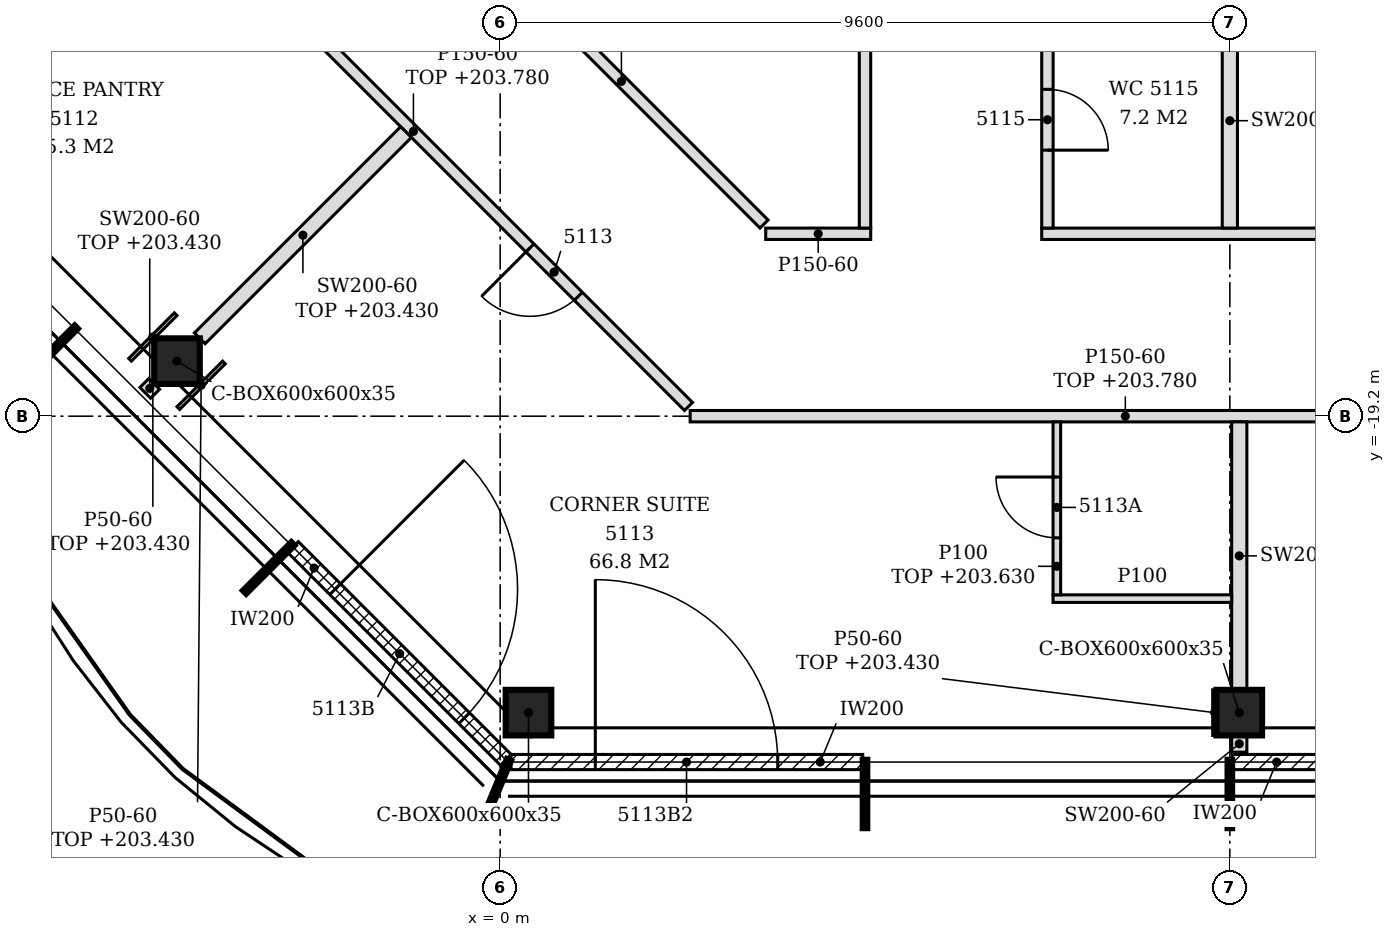
"""IFC4 building model, lengths in metres.
Left out: names, types, materials, properties, quantities, classifications, styles, units other than length and angle.
Written with IfcOpenShell. Run it as: python <this file> out.ifc"""

import sys

from ifc_helpers import new_model, si_unit, direction, frame, frame_2d, origin, origin_2d, place, context, subcontext, project, spatial, polyline, rectangle, hollow_rectangle, outline, extrude, clip, halfspace, element, fill, save


model = new_model("IFC4")
c1 = context("Model", 3, precision=1e-05, world=origin(), true_north=direction((0.0, 1.0)))
c2 = subcontext(c1, "Body", "Model", "MODEL_VIEW")
j1 = project(units=[si_unit("LENGTHUNIT", "METRE"), si_unit("PLANEANGLEUNIT", "RADIAN")], contexts=[c1])
p1 = place(None, origin())
s1 = spatial("IfcSite", under=j1, at=p1, CompositionType="ELEMENT")
p2 = place(p1, origin())
s2 = spatial("IfcBuilding", under=s1, at=p2, CompositionType="ELEMENT")
p3 = place(p2, frame((0.0, 0.0, 201.0)))
s3 = spatial("IfcBuildingStorey", under=s2, at=p3, CompositionType="ELEMENT", Elevation=201.0)
for number, where, z_axis, x_axis in (
    (1, (0.373, -23.1, -0.15), (0.0, 0.0, 1.0), (1.0, 0.0, 0.0)),
    (2, (9.724, -23.1, -0.15), (0.0, 0.0, 1.0), (1.0, 0.0, 0.0)),
    (3, (-4.251, -18.476, -0.15), (0.0, 0.0, 1.0), (1.0, 0.0, 0.0)),
):
    element("IfcColumn", number, at=place(p3, frame(where, z_axis=z_axis, x_axis=x_axis)), inside=s3, PredefinedType="COLUMN", context=c2, shape_type="Clipping", body=[
        clip(clip(extrude(hollow_rectangle(XDim=0.6, YDim=0.6, WallThickness=0.035, at=origin_2d()), origin(), (0.0, 0.0, 1.0), 3.5), halfspace(frame((0.0, 0.0, 0.011), z_axis=(0.0, 0.0, 1.0), x_axis=(1.0, 0.0, 0.0)), True)), halfspace(frame((0.0, 0.0, 3.095), z_axis=(0.0, 0.0, 1.0), x_axis=(1.0, 0.0, 0.0)), False)),
    ])
p4 = place(p3, frame((0.144, -23.75, 0.0), z_axis=(0.0, 0.0, 1.0), x_axis=(1.0, 0.0, 0.0)))
e4 = element("IfcWall", 4, at=p4, inside=s3, PredefinedType="NOTDEFINED", context=c2, shape_type="SweptSolid", body=[
    extrude(rectangle(XDim=4.626, YDim=0.2, at=frame_2d((2.313, 0.0))), origin(), (0.0, 0.0, 1.0), 3.35),
])
p5 = place(p4, frame((1.108, 0.0, 0.0)))
e5 = element("IfcOpeningElement", 5, at=p5, cuts=e4, PredefinedType="OPENING", context=c2, shape_type="SweptSolid", body=[
    extrude(rectangle(XDim=2.4, YDim=2.4, at=frame_2d((1.2, 1.2))), frame((0.0, 0.11, 0.0), z_axis=(0.0, -1.0, 0.0), x_axis=(1.0, 0.0, 0.0)), (0.0, 0.0, 1.0), 0.22),
])
p6 = place(p3, frame((9.63, -23.75, 0.0), z_axis=(0.0, 0.0, 1.0), x_axis=(1.0, 0.0, 0.0)))
e6 = element("IfcWall", 6, at=p6, inside=s3, PredefinedType="NOTDEFINED", context=c2, shape_type="SweptSolid", body=[
    extrude(rectangle(XDim=4.74, YDim=0.2, at=frame_2d((2.37, 0.0))), origin(), (0.0, 0.0, 1.0), 3.35),
])
p7 = place(p6, frame((1.17, 0.0, 0.0)))
e7 = element("IfcOpeningElement", 7, at=p7, cuts=e6, PredefinedType="OPENING", context=c2, shape_type="SweptSolid", body=[
    extrude(rectangle(XDim=2.4, YDim=2.4, at=frame_2d((1.2, 1.2))), frame((0.0, 0.11, 0.0), z_axis=(0.0, -1.0, 0.0), x_axis=(1.0, 0.0, 0.0)), (0.0, 0.0, 1.0), 0.22),
])
p8 = place(p3, frame((-2.726, -20.92, 0.0), z_axis=(0.0, 0.0, 1.0), x_axis=(0.707075965734, -0.707137595296, 0.0)))
e8 = element("IfcWall", 8, at=p8, inside=s3, PredefinedType="NOTDEFINED", context=c2, shape_type="SweptSolid", body=[
    extrude(rectangle(XDim=3.961, YDim=0.2, at=frame_2d((1.981, 0.0))), origin(), (0.0, 0.0, 1.0), 3.35),
])
p9 = place(p8, frame((0.786, 0.0, 0.0)))
e9 = element("IfcOpeningElement", 9, at=p9, cuts=e8, PredefinedType="OPENING", context=c2, shape_type="SweptSolid", body=[
    extrude(rectangle(XDim=2.4, YDim=2.4, at=frame_2d((1.2, 1.2))), frame((0.0, 0.11, 0.0), z_axis=(0.0, -1.0, 0.0), x_axis=(1.0, 0.0, 0.0)), (0.0, 0.0, 1.0), 0.22),
])
p10 = place(p3, frame((9.724, -23.62, 0.0), z_axis=(0.0, 0.0, 1.0), x_axis=(0.0, 1.0, 0.0)))
e10 = element("IfcWall", 10, at=p10, inside=s3, PredefinedType="PARTITIONING", context=c2, shape_type="SweptSolid", body=[
    extrude(outline(polyline([(0.0, 0.0), (0.22, 0.0), (0.22, 2.43), (0.07, 2.43), (0.068, 3.35), (0.0, 3.35), (0.0, 0.0)])), frame((0.0, 0.1, 0.0), z_axis=(0.0, -1.0, 0.0), x_axis=(1.0, 0.0, 0.0)), (0.0, 0.0, 1.0), 0.2),
])
p11 = place(p3, frame((9.724, -22.8, 0.0), z_axis=(0.0, 0.0, 1.0), x_axis=(0.0, 1.0, 0.0)))
e11 = element("IfcWall", 11, at=p11, inside=s3, PredefinedType="PARTITIONING", context=c2, shape_type="SweptSolid", body=[
    extrude(outline(polyline([(0.0, 0.0), (3.525, 0.0), (3.525, 2.78), (3.495, 2.78), (3.493, 3.35), (0.15, 3.35), (0.148, 2.43), (0.0, 2.43), (0.0, 0.0)])), frame((0.0, 0.1, 0.0), z_axis=(0.0, -1.0, 0.0), x_axis=(1.0, 0.0, 0.0)), (0.0, 0.0, 1.0), 0.2),
])
p12 = place(p3, frame((7.274, -21.6, 0.0), z_axis=(0.0, 0.0, 1.0), x_axis=(1.0, 0.0, 0.0)))
e12 = element("IfcWall", 12, at=p12, inside=s3, PredefinedType="PARTITIONING", context=c2, shape_type="SweptSolid", body=[
    extrude(outline(polyline([(0.0, 0.0), (2.35, 0.0), (2.35, 3.35), (0.076, 3.35), (0.074, 2.63), (0.0, 2.63), (0.0, 0.0)])), frame((0.0, 0.05, 0.0), z_axis=(0.0, -1.0, 0.0), x_axis=(1.0, 0.0, 0.0)), (0.0, 0.0, 1.0), 0.1),
])
p13 = place(p3, frame((7.324, -21.55, 0.0), z_axis=(0.0, 0.0, 1.0), x_axis=(0.0, 1.0, 0.0)))
e13 = element("IfcWall", 13, at=p13, inside=s3, PredefinedType="PARTITIONING", context=c2, shape_type="SweptSolid", body=[
    extrude(rectangle(XDim=2.275, YDim=0.1, at=frame_2d((1.138, 0.0))), origin(), (0.0, 0.0, 1.0), 2.63),
])
p14 = place(p13, frame((0.75, 0.0, 0.0)))
e14 = element("IfcOpeningElement", 14, at=p14, cuts=e13, PredefinedType="OPENING", context=c2, shape_type="SweptSolid", body=[
    extrude(rectangle(XDim=0.8, YDim=2.1, at=frame_2d((0.4, 1.05))), frame((0.0, 0.06, 0.0), z_axis=(0.0, -1.0, 0.0), x_axis=(1.0, 0.0, 0.0)), (0.0, 0.0, 1.0), 0.12),
])
p15 = place(p3, frame((2.5, -19.2, 0.0), z_axis=(0.0, 0.0, 1.0), x_axis=(1.0, 0.0, 0.0)))
e15 = element("IfcWall", 15, at=p15, inside=s3, PredefinedType="PARTITIONING", context=c2, shape_type="SweptSolid", body=[
    extrude(outline(polyline([(0.0, 0.0), (24.418, 0.0), (24.418, 2.78), (16.851, 2.78), (16.849, 2.322), (16.549, 2.322), (16.547, 2.78), (4.85, 2.78), (4.848, 2.63), (4.55, 2.63), (4.548, 2.78), (0.0, 2.78), (0.0, 0.0)])), frame((0.0, 0.075, 0.0), z_axis=(0.0, -1.0, 0.0), x_axis=(1.0, 0.0, 0.0)), (0.0, 0.0, 1.0), 0.15),
])
p16 = place(p15, frame((11.45, 0.0, 0.0)))
e16 = element("IfcOpeningElement", 16, at=p16, cuts=e15, PredefinedType="OPENING", context=c2, shape_type="SweptSolid", body=[
    extrude(rectangle(XDim=0.9, YDim=2.1, at=frame_2d((0.45, 1.05))), frame((0.0, 0.085, 0.0), z_axis=(0.0, -1.0, 0.0), x_axis=(1.0, 0.0, 0.0)), (0.0, 0.0, 1.0), 0.17),
])
p17 = place(p15, frame((18.794, 0.0, 0.0)))
e17 = element("IfcOpeningElement", 17, at=p17, cuts=e15, PredefinedType="OPENING", context=c2, shape_type="SweptSolid", body=[
    extrude(rectangle(XDim=0.9, YDim=2.1, at=frame_2d((0.45, 1.05))), frame((0.0, 0.085, 0.0), z_axis=(0.0, -1.0, 0.0), x_axis=(1.0, 0.0, 0.0)), (0.0, 0.0, 1.0), 0.17),
])
p18 = place(p3, frame((2.478, -19.072, 0.0), z_axis=(0.0, 0.0, 1.0), x_axis=(-0.707106781187, 0.707106781187, 0.0)))
e18 = element("IfcWall", 18, at=p18, inside=s3, PredefinedType="PARTITIONING", context=c2, shape_type="SweptSolid", body=[
    extrude(rectangle(XDim=10.112, YDim=0.15, at=frame_2d((5.056, 0.0))), origin(), (0.0, 0.0, 1.0), 2.78),
])
p19 = place(p18, frame((7.286, 0.0, 0.0)))
e19 = element("IfcOpeningElement", 19, at=p19, cuts=e18, PredefinedType="OPENING", context=c2, shape_type="SweptSolid", body=[
    extrude(rectangle(XDim=0.9, YDim=2.1, at=frame_2d((0.45, 1.05))), frame((0.0, 0.085, 0.0), z_axis=(0.0, -1.0, 0.0), x_axis=(1.0, 0.0, 0.0)), (0.0, 0.0, 1.0), 0.17),
])
p20 = place(p18, frame((2.05, 0.0, 0.0)))
e20 = element("IfcOpeningElement", 20, at=p20, cuts=e18, PredefinedType="OPENING", context=c2, shape_type="SweptSolid", body=[
    extrude(rectangle(XDim=0.9, YDim=2.1, at=frame_2d((0.45, 1.05))), frame((0.0, 0.085, 0.0), z_axis=(0.0, -1.0, 0.0), x_axis=(1.0, 0.0, 0.0)), (0.0, 0.0, 1.0), 0.17),
])
p21 = place(p3, frame((-4.669, -18.893, 0.0), z_axis=(0.0, 0.0, 1.0), x_axis=(0.707106781187, 0.707106781187, 0.0)))
e21 = element("IfcWall", 21, at=p21, inside=s3, PredefinedType="PARTITIONING", context=c2, shape_type="SweptSolid", body=[
    extrude(rectangle(XDim=0.166, YDim=0.2, at=frame_2d((0.083, 0.0))), origin(), (0.0, 0.0, 1.0), 2.43),
])
p22 = place(p3, frame((-3.952, -18.176, 0.0), z_axis=(0.0, 0.0, 1.0), x_axis=(0.707138590574, 0.707074970368, 0.0)))
e22 = element("IfcWall", 22, at=p22, inside=s3, PredefinedType="PARTITIONING", context=c2, shape_type="SweptSolid", body=[
    extrude(rectangle(XDim=3.837, YDim=0.2, at=frame_2d((1.919, 0.0))), origin(), (0.0, 0.0, 1.0), 2.43),
])
p23 = place(p3, frame((3.494, -16.8, 0.0), z_axis=(0.0, 0.0, 1.0), x_axis=(1.0, 0.0, 0.0)))
e23 = element("IfcWall", 23, at=p23, inside=s3, PredefinedType="PARTITIONING", context=c2, shape_type="SweptSolid", body=[
    extrude(rectangle(XDim=1.381, YDim=0.15, at=frame_2d((0.69, 0.0))), origin(), (0.0, 0.0, 1.0), 3.35),
])
p24 = place(p3, frame((7.125, -16.8, 0.0), z_axis=(0.0, 0.0, 1.0), x_axis=(1.0, 0.0, 0.0)))
e24 = element("IfcWall", 24, at=p24, inside=s3, PredefinedType="PARTITIONING", context=c2, shape_type="SweptSolid", body=[
    extrude(outline(polyline([(0.0, 0.0), (18.46, 0.0), (18.46, 3.35), (12.226, 3.35), (12.224, 2.322), (11.924, 2.322), (11.922, 3.35), (0.225, 3.35), (0.223, 2.63), (0.0, 2.63), (0.0, 0.0)])), frame((0.0, 0.075, 0.0), z_axis=(0.0, -1.0, 0.0), x_axis=(1.0, 0.0, 0.0)), (0.0, 0.0, 1.0), 0.15),
])
p25 = place(p3, frame((3.472, -16.672, 0.0), z_axis=(0.0, 0.0, 1.0), x_axis=(-0.70709609053, 0.707117471682, 0.0)))
e25 = element("IfcWall", 25, at=p25, inside=s3, PredefinedType="PARTITIONING", context=c2, shape_type="SweptSolid", body=[
    extrude(rectangle(XDim=11.418, YDim=0.15, at=frame_2d((5.709, 0.0))), origin(), (0.0, 0.0, 1.0), 2.78),
])
p26 = place(p25, frame((5.308, 0.0, 0.0)))
e26 = element("IfcOpeningElement", 26, at=p26, cuts=e25, PredefinedType="OPENING", context=c2, shape_type="SweptSolid", body=[
    extrude(rectangle(XDim=0.9, YDim=2.1, at=frame_2d((0.45, 1.05))), frame((0.0, 0.085, 0.0), z_axis=(0.0, -1.0, 0.0), x_axis=(1.0, 0.0, 0.0)), (0.0, 0.0, 1.0), 0.17),
])
p27 = place(p3, frame((4.8, -16.725, 0.0), z_axis=(0.0, 0.0, 1.0), x_axis=(0.0, 1.0, 0.0)))
e27 = element("IfcWall", 27, at=p27, inside=s3, PredefinedType="PARTITIONING", context=c2, shape_type="SweptSolid", body=[
    extrude(outline(polyline([(0.0, 0.0), (8.25, 0.0), (8.25, 2.73), (8.175, 2.73), (8.173, 3.35), (2.43, 3.35), (2.428, 2.78), (2.22, 2.78), (2.218, 3.35), (0.0, 3.35), (0.0, 0.0)])), frame((0.0, 0.075, 0.0), z_axis=(0.0, -1.0, 0.0), x_axis=(1.0, 0.0, 0.0)), (0.0, 0.0, 1.0), 0.15),
])
p28 = place(p3, frame((7.2, -16.725, 0.0), z_axis=(0.0, 0.0, 1.0), x_axis=(0.0, 1.0, 0.0)))
e28 = element("IfcWall", 28, at=p28, inside=s3, PredefinedType="PARTITIONING", context=c2, shape_type="SweptSolid", body=[
    extrude(rectangle(XDim=8.129, YDim=0.15, at=frame_2d((4.064, 0.0))), origin(), (0.0, 0.0, 1.0), 2.63),
])
p29 = place(p28, frame((1.025, 0.0, 0.0)))
e29 = element("IfcOpeningElement", 29, at=p29, cuts=e28, PredefinedType="OPENING", context=c2, shape_type="SweptSolid", body=[
    extrude(rectangle(XDim=0.8, YDim=2.1, at=frame_2d((0.4, 1.05))), frame((0.0, 0.085, 0.0), z_axis=(0.0, -1.0, 0.0), x_axis=(1.0, 0.0, 0.0)), (0.0, 0.0, 1.0), 0.17),
])
p30 = place(p3, frame((9.6, -16.725, 0.0), z_axis=(0.0, 0.0, 1.0), x_axis=(0.0, 1.0, 0.0)))
e30 = element("IfcWall", 30, at=p30, inside=s3, PredefinedType="PARTITIONING", context=c2, shape_type="SweptSolid", body=[
    extrude(outline(polyline([(0.0, 0.0), (2.825, 0.0), (2.825, 3.35), (2.43, 3.35), (2.428, 2.78), (2.22, 2.78), (2.218, 3.35), (0.0, 3.35), (0.0, 0.0)])), frame((0.0, 0.1, 0.0), z_axis=(0.0, -1.0, 0.0), x_axis=(1.0, 0.0, 0.0)), (0.0, 0.0, 1.0), 0.2),
])
p31 = place(p3, frame((9.399, -23.4, 0.0), z_axis=(0.0, 0.0, 1.0), x_axis=(0.0, 1.0, 0.0)))
e31 = element("IfcWall", 31, at=p31, inside=s3, PredefinedType="PARTITIONING", context=c2, shape_type="SweptSolid", body=[
    extrude(rectangle(XDim=0.6, YDim=0.05, at=frame_2d((0.3, 0.0))), origin(), (0.0, 0.0, 1.0), 2.43),
])
p32 = place(p3, frame((-4.869, -18.458, 0.0), z_axis=(0.0, 0.0, 1.0), x_axis=(0.706962899457, 0.707250633645, 0.0)))
e32 = element("IfcWall", 32, at=p32, inside=s3, PredefinedType="PARTITIONING", context=c2, shape_type="SweptSolid", body=[
    extrude(rectangle(XDim=0.848, YDim=0.05, at=frame_2d((0.424, 0.0))), origin(), (0.0, 0.0, 1.0), 2.43),
])
p33 = place(p3, frame((-4.234, -19.094, 0.0), z_axis=(0.0, 0.0, 1.0), x_axis=(0.707106781187, 0.707106781187, 0.0)))
e33 = element("IfcWall", 33, at=p33, inside=s3, PredefinedType="PARTITIONING", context=c2, shape_type="SweptSolid", body=[
    extrude(rectangle(XDim=0.849, YDim=0.05, at=frame_2d((0.424, 0.0))), origin(), (0.0, 0.0, 1.0), 2.43),
])
p34 = place(p5, origin())
e34 = element("IfcDoor", 34, at=p34, inside=s3, OperationType="SINGLE_SWING_LEFT", PredefinedType="DOOR", context=c2, shape_type="SweptSolid", body=[
    extrude(rectangle(XDim=2.4, YDim=2.4, at=frame_2d((1.2, 1.2))), frame((0.0, 0.025, 0.0), z_axis=(0.0, -1.0, 0.0), x_axis=(1.0, 0.0, 0.0)), (0.0, 0.0, 1.0), 0.05),
])
fill(e5, e34)
p35 = place(p9, origin())
e35 = element("IfcDoor", 35, at=p35, inside=s3, OperationType="SINGLE_SWING_LEFT", PredefinedType="DOOR", context=c2, shape_type="SweptSolid", body=[
    extrude(rectangle(XDim=2.4, YDim=2.4, at=frame_2d((1.2, 1.2))), frame((0.0, 0.025, 0.0), z_axis=(0.0, -1.0, 0.0), x_axis=(1.0, 0.0, 0.0)), (0.0, 0.0, 1.0), 0.05),
])
fill(e9, e35)
p36 = place(p20, origin())
e36 = element("IfcDoor", 36, at=p36, inside=s3, OperationType="SINGLE_SWING_RIGHT", PredefinedType="DOOR", context=c2, shape_type="SweptSolid", body=[
    extrude(rectangle(XDim=0.9, YDim=2.1, at=frame_2d((0.45, 1.05))), frame((0.0, 0.025, 0.0), z_axis=(0.0, -1.0, 0.0), x_axis=(1.0, 0.0, 0.0)), (0.0, 0.0, 1.0), 0.05),
])
fill(e20, e36)
p37 = place(p14, origin())
e37 = element("IfcDoor", 37, at=p37, inside=s3, OperationType="SINGLE_SWING_RIGHT", PredefinedType="DOOR", context=c2, shape_type="SweptSolid", body=[
    extrude(rectangle(XDim=0.8, YDim=2.1, at=frame_2d((0.4, 1.05))), frame((0.0, 0.025, 0.0), z_axis=(0.0, -1.0, 0.0), x_axis=(1.0, 0.0, 0.0)), (0.0, 0.0, 1.0), 0.05),
])
fill(e14, e37)
p38 = place(p29, frame((0.8, 0.0, 0.0), z_axis=(0.0, 0.0, 1.0), x_axis=(-1.0, 0.0, 0.0)))
e38 = element("IfcDoor", 38, at=p38, inside=s3, OperationType="SINGLE_SWING_RIGHT", PredefinedType="DOOR", context=c2, shape_type="SweptSolid", body=[
    extrude(rectangle(XDim=0.8, YDim=2.1, at=frame_2d((0.4, 1.05))), frame((0.0, 0.025, 0.0), z_axis=(0.0, -1.0, 0.0), x_axis=(1.0, 0.0, 0.0)), (0.0, 0.0, 1.0), 0.05),
])
fill(e29, e38)
save(model, sys.argv[1])
